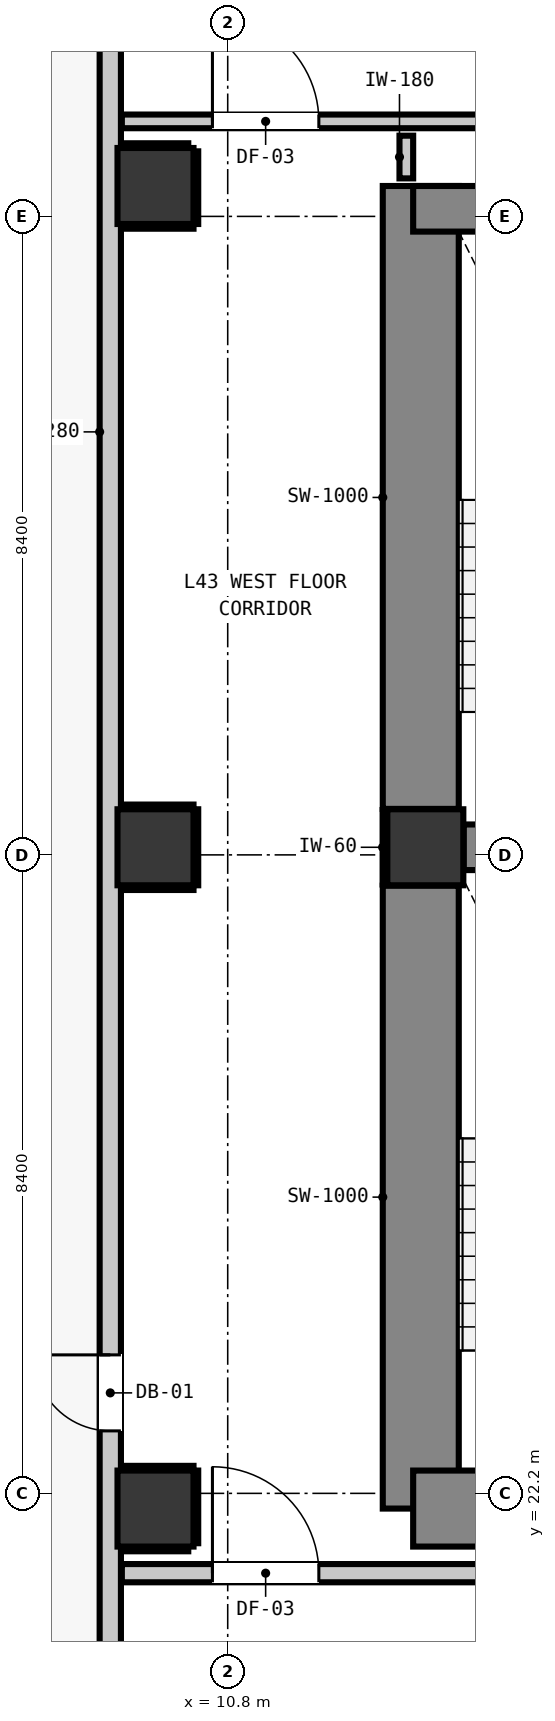
"""IFC4 building model, lengths in metres.
Left out: names, types, materials, properties, quantities, classifications, styles, units other than length and angle.
Written with IfcOpenShell. Run it as: python <this file> out.ifc"""

import sys

from ifc_helpers import new_model, si_unit, direction, frame, frame_2d, origin, origin_2d, place, context, subcontext, project, spatial, rectangle, extrude, element, fill, save


model = new_model("IFC4")
c1 = context("Model", 3, precision=1e-05, world=origin(), true_north=direction((0.0, 1.0)))
c2 = subcontext(c1, "Body", "Model", "MODEL_VIEW")
j1 = project(units=[si_unit("LENGTHUNIT", "METRE"), si_unit("PLANEANGLEUNIT", "RADIAN")], contexts=[c1])
p1 = place(None, origin())
s1 = spatial("IfcSite", under=j1, at=p1, CompositionType="ELEMENT")
p2 = place(p1, origin())
s2 = spatial("IfcBuilding", under=s1, at=p2, CompositionType="ELEMENT")
p3 = place(p2, frame((0.0, 0.0, 149.24)))
s3 = spatial("IfcBuildingStorey", under=s2, at=p3, CompositionType="ELEMENT", Elevation=149.24)
p4 = place(p3, frame((13.4, 30.7, 0.0), z_axis=(0.0, 0.0, 1.0), x_axis=(1.0, 0.0, 0.0)))
e1 = element("IfcColumn", 1, at=p4, inside=s3, PredefinedType="COLUMN", context=c2, shape_type="SweptSolid", body=[
    extrude(rectangle(XDim=1.0, YDim=1.0, at=origin_2d()), origin(), (0.0, 0.0, 1.0), 3.32),
])
p5 = place(p3, frame((13.34, 22.0, 0.0), z_axis=(0.0, 0.0, 1.0), x_axis=(0.0, 1.0, 0.0)))
e2 = element("IfcWall", 2, at=p5, inside=s3, PredefinedType="SHEAR", context=c2, shape_type="SweptSolid", body=[
    extrude(rectangle(XDim=8.195, YDim=1.0, at=frame_2d((4.098, 0.0))), origin(), (0.0, 0.0, 1.0), 3.32),
])
p6 = place(p3, frame((13.34, 31.205, 0.0), z_axis=(0.0, 0.0, 1.0), x_axis=(0.0, 1.0, 0.0)))
e3 = element("IfcWall", 3, at=p6, inside=s3, PredefinedType="SHEAR", context=c2, shape_type="SweptSolid", body=[
    extrude(rectangle(XDim=8.195, YDim=1.0, at=frame_2d((4.097, 0.0))), origin(), (0.0, 0.0, 1.0), 3.32),
])
p7 = place(p3, frame((13.24, 22.0, 0.0), z_axis=(0.0, 0.0, 1.0), x_axis=(1.0, 0.0, 0.0)))
e4 = element("IfcWall", 4, at=p7, inside=s3, PredefinedType="SHEAR", context=c2, shape_type="SweptSolid", body=[
    extrude(rectangle(XDim=4.08, YDim=1.0, at=frame_2d((2.04, 0.0))), origin(), (0.0, 0.0, 1.0), 3.32),
])
p8 = place(p3, frame((13.24, 39.1, 0.0), z_axis=(0.0, 0.0, 1.0), x_axis=(1.0, 0.0, 0.0)))
e5 = element("IfcWall", 5, at=p8, inside=s3, PredefinedType="SHEAR", context=c2, shape_type="SweptSolid", body=[
    extrude(rectangle(XDim=4.08, YDim=0.6, at=frame_2d((2.04, 0.0))), origin(), (0.0, 0.0, 1.0), 3.32),
])
p9 = place(p3, frame((13.905, 30.7, 0.0), z_axis=(0.0, 0.0, 1.0), x_axis=(1.0, 0.0, 0.0)))
e6 = element("IfcWall", 6, at=p9, inside=s3, PredefinedType="SHEAR", context=c2, shape_type="SweptSolid", body=[
    extrude(rectangle(XDim=3.415, YDim=0.6, at=frame_2d((1.708, 0.0))), origin(), (0.0, 0.0, 1.0), 3.32),
])
for number, where, z_axis, x_axis in (
    (7, (9.85, 22.0, 0.0), (0.0, 0.0, 1.0), (1.0, 0.0, 0.0)),
    (8, (9.85, 30.7, 0.0), (0.0, 0.0, 1.0), (1.0, 0.0, 0.0)),
    (9, (9.85, 39.4, 0.0), (0.0, 0.0, 1.0), (1.0, 0.0, 0.0)),
):
    element("IfcColumn", number, at=place(p3, frame(where, z_axis=z_axis, x_axis=x_axis)), inside=s3, PredefinedType="COLUMN", context=c2, shape_type="SweptSolid", body=[
        extrude(rectangle(XDim=1.0, YDim=1.0, at=origin_2d()), origin(), (0.0, 0.0, 1.0), 3.32),
    ])
p10 = place(p3, frame((9.255, 17.555, 0.0), z_axis=(0.0, 0.0, 1.0), x_axis=(0.0, 1.0, 0.0)))
e10 = element("IfcWall", 10, at=p10, inside=s3, PredefinedType="STANDARD", context=c2, shape_type="SweptSolid", body=[
    extrude(rectangle(XDim=32.29, YDim=0.28, at=frame_2d((16.145, 0.0))), origin(), (0.0, 0.0, 1.0), 3.08),
])
p11 = place(p10, frame((5.467, 0.0, 0.0)))
e11 = element("IfcOpeningElement", 11, at=p11, cuts=e10, PredefinedType="OPENING", context=c2, shape_type="SweptSolid", body=[
    extrude(rectangle(XDim=1.0, YDim=2.15, at=frame_2d((0.5, 1.075))), frame((0.0, 0.15, 0.0), z_axis=(0.0, -1.0, 0.0), x_axis=(1.0, 0.0, 0.0)), (0.0, 0.0, 1.0), 0.3),
])
p12 = place(p10, frame((30.753, 0.0, 0.85)))
e12 = element("IfcOpeningElement", 12, at=p12, cuts=e10, PredefinedType="OPENING", context=c2, shape_type="SweptSolid", body=[
    extrude(rectangle(XDim=1.05, YDim=1.65, at=frame_2d((0.525, 0.825))), frame((0.0, 0.15, 0.0), z_axis=(0.0, -1.0, 0.0), x_axis=(1.0, 0.0, 0.0)), (0.0, 0.0, 1.0), 0.3),
])
p13 = place(p3, frame((9.407, 21.15, 0.0), z_axis=(0.0, 0.0, 1.0), x_axis=(1.0, 0.0, 0.0)))
e13 = element("IfcWall", 13, at=p13, inside=s3, PredefinedType="PARTITIONING", context=c2, shape_type="SweptSolid", body=[
    extrude(rectangle(XDim=27.532, YDim=0.24, at=frame_2d((13.766, 0.0))), origin(), (0.0, 0.0, 1.0), 3.08),
])
p14 = place(p13, frame((8.803, 0.0, 0.0)))
e14 = element("IfcOpeningElement", 14, at=p14, cuts=e13, PredefinedType="OPENING", context=c2, shape_type="SweptSolid", body=[
    extrude(rectangle(XDim=1.1, YDim=2.15, at=frame_2d((0.55, 1.075))), frame((0.0, 0.13, 0.0), z_axis=(0.0, -1.0, 0.0), x_axis=(1.0, 0.0, 0.0)), (0.0, 0.0, 1.0), 0.26),
])
p15 = place(p13, frame((1.192, 0.0, 0.0)))
e15 = element("IfcOpeningElement", 15, at=p15, cuts=e13, PredefinedType="OPENING", context=c2, shape_type="SweptSolid", body=[
    extrude(rectangle(XDim=1.4, YDim=2.15, at=frame_2d((0.7, 1.075))), frame((0.0, 0.13, 0.0), z_axis=(0.0, -1.0, 0.0), x_axis=(1.0, 0.0, 0.0)), (0.0, 0.0, 1.0), 0.26),
])
p16 = place(p3, frame((9.407, 40.25, 0.0), z_axis=(0.0, 0.0, 1.0), x_axis=(1.0, 0.0, 0.0)))
e16 = element("IfcWall", 16, at=p16, inside=s3, PredefinedType="PARTITIONING", context=c2, shape_type="SweptSolid", body=[
    extrude(rectangle(XDim=39.386, YDim=0.18, at=frame_2d((19.693, 0.0))), origin(), (0.0, 0.0, 1.0), 3.08),
])
p17 = place(p16, frame((8.028, 0.0, 0.0)))
e17 = element("IfcOpeningElement", 17, at=p17, cuts=e16, PredefinedType="OPENING", context=c2, shape_type="SweptSolid", body=[
    extrude(rectangle(XDim=1.4, YDim=2.15, at=frame_2d((0.7, 1.075))), frame((0.0, 0.1, 0.0), z_axis=(0.0, -1.0, 0.0), x_axis=(1.0, 0.0, 0.0)), (0.0, 0.0, 1.0), 0.2),
])
p18 = place(p16, frame((1.192, 0.0, 0.0)))
e18 = element("IfcOpeningElement", 18, at=p18, cuts=e16, PredefinedType="OPENING", context=c2, shape_type="SweptSolid", body=[
    extrude(rectangle(XDim=1.4, YDim=2.15, at=frame_2d((0.7, 1.075))), frame((0.0, 0.1, 0.0), z_axis=(0.0, -1.0, 0.0), x_axis=(1.0, 0.0, 0.0)), (0.0, 0.0, 1.0), 0.2),
])
p19 = place(p16, frame((28.643, 0.0, 0.0)))
e19 = element("IfcOpeningElement", 19, at=p19, cuts=e16, PredefinedType="OPENING", context=c2, shape_type="SweptSolid", body=[
    extrude(rectangle(XDim=1.4, YDim=2.15, at=frame_2d((0.7, 1.075))), frame((0.0, 0.1, 0.0), z_axis=(0.0, -1.0, 0.0), x_axis=(1.0, 0.0, 0.0)), (0.0, 0.0, 1.0), 0.2),
])
p20 = place(p3, frame((13.15, 39.5, 0.0), z_axis=(0.0, 0.0, 1.0), x_axis=(0.0, 1.0, 0.0)))
e20 = element("IfcWall", 20, at=p20, inside=s3, PredefinedType="PARTITIONING", context=c2, shape_type="SweptSolid", body=[
    extrude(rectangle(XDim=0.562, YDim=0.18, at=frame_2d((0.281, 0.0))), origin(), (0.0, 0.0, 1.0), 2.315),
])
p21 = place(p3, frame((12.868, 30.21, 0.0), z_axis=(0.0, 0.0, 1.0), x_axis=(0.0, 1.0, 0.0)))
e21 = element("IfcWall", 21, at=p21, inside=s3, PredefinedType="PARTITIONING", context=c2, shape_type="SweptSolid", body=[
    extrude(rectangle(XDim=0.98, YDim=0.06, at=frame_2d((0.49, 0.0))), origin(), (0.0, 0.0, 1.0), 1.45),
])
p22 = place(p3, frame((9.41, 21.468, 0.0), z_axis=(0.0, 0.0, 1.0), x_axis=(1.0, 0.0, 0.0)))
e22 = element("IfcWall", 22, at=p22, inside=s3, PredefinedType="PARTITIONING", context=c2, shape_type="SweptSolid", body=[
    extrude(rectangle(XDim=0.871, YDim=0.06, at=frame_2d((0.436, 0.0))), origin(), (0.0, 0.0, 1.0), 1.45),
])
p23 = place(p3, frame((9.41, 22.532, 0.0), z_axis=(0.0, 0.0, 1.0), x_axis=(1.0, 0.0, 0.0)))
e23 = element("IfcWall", 23, at=p23, inside=s3, PredefinedType="PARTITIONING", context=c2, shape_type="SweptSolid", body=[
    extrude(rectangle(XDim=0.94, YDim=0.06, at=frame_2d((0.47, 0.0))), origin(), (0.0, 0.0, 1.0), 1.45),
])
p24 = place(p3, frame((10.382, 21.544, 0.0), z_axis=(0.0, 0.0, 1.0), x_axis=(0.0, 1.0, 0.0)))
e24 = element("IfcWall", 24, at=p24, inside=s3, PredefinedType="PARTITIONING", context=c2, shape_type="SweptSolid", body=[
    extrude(rectangle(XDim=0.956, YDim=0.06, at=frame_2d((0.478, 0.0))), origin(), (0.0, 0.0, 1.0), 1.45),
])
for number, where, z_axis, x_axis in (
    (25, (9.41, 30.168, 0.0), (0.0, 0.0, 1.0), (1.0, 0.0, 0.0)),
    (26, (9.41, 31.232, 0.0), (0.0, 0.0, 1.0), (1.0, 0.0, 0.0)),
):
    element("IfcWall", number, at=place(p3, frame(where, z_axis=z_axis, x_axis=x_axis)), inside=s3, PredefinedType="PARTITIONING", context=c2, shape_type="SweptSolid", body=[
        extrude(rectangle(XDim=0.94, YDim=0.06, at=frame_2d((0.47, 0.0))), origin(), (0.0, 0.0, 1.0), 1.45),
    ])
p25 = place(p3, frame((10.382, 30.2, 0.0), z_axis=(0.0, 0.0, 1.0), x_axis=(0.0, 1.0, 0.0)))
e27 = element("IfcWall", 27, at=p25, inside=s3, PredefinedType="PARTITIONING", context=c2, shape_type="SweptSolid", body=[
    extrude(rectangle(XDim=1.0, YDim=0.06, at=frame_2d((0.5, 0.0))), origin(), (0.0, 0.0, 1.0), 1.45),
])
p26 = place(p3, frame((9.41, 38.868, 0.0), z_axis=(0.0, 0.0, 1.0), x_axis=(1.0, 0.0, 0.0)))
e28 = element("IfcWall", 28, at=p26, inside=s3, PredefinedType="PARTITIONING", context=c2, shape_type="SweptSolid", body=[
    extrude(rectangle(XDim=0.94, YDim=0.06, at=frame_2d((0.47, 0.0))), origin(), (0.0, 0.0, 1.0), 1.45),
])
p27 = place(p3, frame((9.41, 39.932, 0.0), z_axis=(0.0, 0.0, 1.0), x_axis=(1.0, 0.0, 0.0)))
e29 = element("IfcWall", 29, at=p27, inside=s3, PredefinedType="PARTITIONING", context=c2, shape_type="SweptSolid", body=[
    extrude(rectangle(XDim=0.871, YDim=0.06, at=frame_2d((0.436, 0.0))), origin(), (0.0, 0.0, 1.0), 1.45),
])
p28 = place(p3, frame((10.382, 38.9, 0.0), z_axis=(0.0, 0.0, 1.0), x_axis=(0.0, 1.0, 0.0)))
e30 = element("IfcWall", 30, at=p28, inside=s3, PredefinedType="PARTITIONING", context=c2, shape_type="SweptSolid", body=[
    extrude(rectangle(XDim=0.956, YDim=0.06, at=frame_2d((0.478, 0.0))), origin(), (0.0, 0.0, 1.0), 1.45),
])
p29 = place(p11, origin())
e31 = element("IfcDoor", 31, at=p29, inside=s3, OperationType="SINGLE_SWING_RIGHT", PredefinedType="DOOR", context=c2, shape_type="SweptSolid", body=[
    extrude(rectangle(XDim=1.0, YDim=2.15, at=frame_2d((0.5, 1.075))), frame((0.0, 0.025, 0.0), z_axis=(0.0, -1.0, 0.0), x_axis=(1.0, 0.0, 0.0)), (0.0, 0.0, 1.0), 0.05),
])
fill(e11, e31)
p30 = place(p15, origin())
e32 = element("IfcDoor", 32, at=p30, inside=s3, OperationType="SINGLE_SWING_LEFT", PredefinedType="DOOR", context=c2, shape_type="SweptSolid", body=[
    extrude(rectangle(XDim=1.4, YDim=2.15, at=frame_2d((0.7, 1.075))), frame((0.0, 0.025, 0.0), z_axis=(0.0, -1.0, 0.0), x_axis=(1.0, 0.0, 0.0)), (0.0, 0.0, 1.0), 0.05),
])
fill(e15, e32)
p31 = place(p18, origin())
e33 = element("IfcDoor", 33, at=p31, inside=s3, OperationType="SINGLE_SWING_LEFT", PredefinedType="DOOR", context=c2, shape_type="SweptSolid", body=[
    extrude(rectangle(XDim=1.4, YDim=2.15, at=frame_2d((0.7, 1.075))), frame((0.0, 0.025, 0.0), z_axis=(0.0, -1.0, 0.0), x_axis=(1.0, 0.0, 0.0)), (0.0, 0.0, 1.0), 0.05),
])
fill(e18, e33)
save(model, sys.argv[1])
